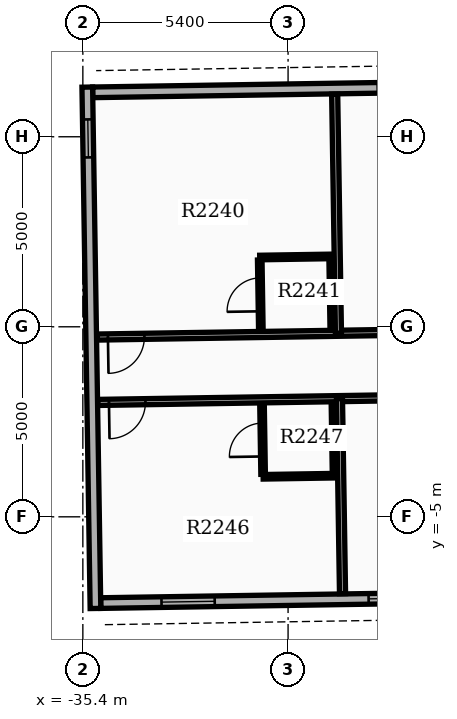
"""IFC4 building model, lengths in metres.
Left out: names, types, materials, properties, quantities, classifications, styles, units other than length and angle.
Written with IfcOpenShell. Run it as: python <this file> out.ifc"""

import sys

from ifc_helpers import new_model, si_unit, direction, frame, frame_2d, origin, place, context, subcontext, project, spatial, rectangle, extrude, element, fill, save


model = new_model("IFC4")
c1 = context("Model", 3, precision=1e-05, world=origin(), true_north=direction((0.0, 1.0)))
c2 = subcontext(c1, "Body", "Model", "MODEL_VIEW")
j1 = project(units=[si_unit("LENGTHUNIT", "METRE"), si_unit("PLANEANGLEUNIT", "RADIAN")], contexts=[c1])
p1 = place(None, origin())
s1 = spatial("IfcSite", under=j1, at=p1, CompositionType="ELEMENT")
p2 = place(p1, origin())
s2 = spatial("IfcBuilding", under=s1, at=p2, CompositionType="ELEMENT")
p3 = place(p2, frame((0.0, 0.0, 139.8)))
s3 = spatial("IfcBuildingStorey", under=s2, at=p3, CompositionType="ELEMENT", Elevation=139.8)
p4 = place(p3, frame((-15.044, 6.485, 0.0), z_axis=(0.0, 0.0, 1.0), x_axis=(-0.999876474133, -0.01571739401, 0.0)))
e1 = element("IfcWall", 1, at=p4, inside=s3, PredefinedType="STANDARD", context=c2, shape_type="SweptSolid", body=[
    extrude(rectangle(XDim=20.1, YDim=0.28, at=frame_2d((10.05, 0.0))), origin(), (0.0, 0.0, 1.0), 2.92),
])
p5 = place(p4, frame((1.6, 0.0, 0.8)))
e2 = element("IfcOpeningElement", 2, at=p5, cuts=e1, PredefinedType="OPENING", context=c2, shape_type="SweptSolid", body=[
    extrude(rectangle(XDim=1.4, YDim=1.6, at=frame_2d((0.7, 0.8))), frame((0.0, 0.15, 0.0), z_axis=(0.0, -1.0, 0.0), x_axis=(1.0, 0.0, 0.0)), (0.0, 0.0, 1.0), 0.3),
])
p6 = place(p4, frame((4.8, 0.0, 0.8)))
e3 = element("IfcOpeningElement", 3, at=p6, cuts=e1, PredefinedType="OPENING", context=c2, shape_type="SweptSolid", body=[
    extrude(rectangle(XDim=1.4, YDim=1.6, at=frame_2d((0.7, 0.8))), frame((0.0, 0.15, 0.0), z_axis=(0.0, -1.0, 0.0), x_axis=(1.0, 0.0, 0.0)), (0.0, 0.0, 1.0), 0.3),
])
p7 = place(p4, frame((8.0, 0.0, 0.8)))
e4 = element("IfcOpeningElement", 4, at=p7, cuts=e1, PredefinedType="OPENING", context=c2, shape_type="SweptSolid", body=[
    extrude(rectangle(XDim=1.4, YDim=1.6, at=frame_2d((0.7, 0.8))), frame((0.0, 0.15, 0.0), z_axis=(0.0, -1.0, 0.0), x_axis=(1.0, 0.0, 0.0)), (0.0, 0.0, 1.0), 0.3),
])
p8 = place(p4, frame((11.2, 0.0, 0.8)))
e5 = element("IfcOpeningElement", 5, at=p8, cuts=e1, PredefinedType="OPENING", context=c2, shape_type="SweptSolid", body=[
    extrude(rectangle(XDim=1.4, YDim=1.6, at=frame_2d((0.7, 0.8))), frame((0.0, 0.15, 0.0), z_axis=(0.0, -1.0, 0.0), x_axis=(1.0, 0.0, 0.0)), (0.0, 0.0, 1.0), 0.3),
])
p9 = place(p3, frame((-34.93, -7.27, 0.0), z_axis=(0.0, 0.0, 1.0), x_axis=(0.999876667941, 0.015705059908, 0.0)))
e6 = element("IfcWall", 6, at=p9, inside=s3, PredefinedType="STANDARD", context=c2, shape_type="SweptSolid", body=[
    extrude(rectangle(XDim=20.1, YDim=0.28, at=frame_2d((10.05, 0.0))), origin(), (0.0, 0.0, 1.0), 2.92),
])
p10 = place(p9, frame((1.6, 0.0, 0.8)))
e7 = element("IfcOpeningElement", 7, at=p10, cuts=e6, PredefinedType="OPENING", context=c2, shape_type="SweptSolid", body=[
    extrude(rectangle(XDim=1.4, YDim=1.6, at=frame_2d((0.7, 0.8))), frame((0.0, 0.15, 0.0), z_axis=(0.0, -1.0, 0.0), x_axis=(1.0, 0.0, 0.0)), (0.0, 0.0, 1.0), 0.3),
])
p11 = place(p9, frame((7.05, 0.0, 0.8)))
e8 = element("IfcOpeningElement", 8, at=p11, cuts=e6, PredefinedType="OPENING", context=c2, shape_type="SweptSolid", body=[
    extrude(rectangle(XDim=1.4, YDim=1.6, at=frame_2d((0.7, 0.8))), frame((0.0, 0.15, 0.0), z_axis=(0.0, -1.0, 0.0), x_axis=(1.0, 0.0, 0.0)), (0.0, 0.0, 1.0), 0.3),
])
p12 = place(p9, frame((10.25, 0.0, 0.8)))
e9 = element("IfcOpeningElement", 9, at=p12, cuts=e6, PredefinedType="OPENING", context=c2, shape_type="SweptSolid", body=[
    extrude(rectangle(XDim=1.4, YDim=1.6, at=frame_2d((0.7, 0.8))), frame((0.0, 0.15, 0.0), z_axis=(0.0, -1.0, 0.0), x_axis=(1.0, 0.0, 0.0)), (0.0, 0.0, 1.0), 0.3),
])
p13 = place(p9, frame((13.95, 0.0, 0.8)))
e10 = element("IfcOpeningElement", 10, at=p13, cuts=e6, PredefinedType="OPENING", context=c2, shape_type="SweptSolid", body=[
    extrude(rectangle(XDim=1.4, YDim=1.6, at=frame_2d((0.7, 0.8))), frame((0.0, 0.15, 0.0), z_axis=(0.0, -1.0, 0.0), x_axis=(1.0, 0.0, 0.0)), (0.0, 0.0, 1.0), 0.3),
])
p14 = place(p3, frame((-35.283, 6.307, 0.0), z_axis=(0.0, 0.0, 1.0), x_axis=(0.015712599986, -0.999876549481, 0.0)))
e11 = element("IfcWall", 11, at=p14, inside=s3, PredefinedType="STANDARD", context=c2, shape_type="SweptSolid", body=[
    extrude(rectangle(XDim=13.72, YDim=0.28, at=frame_2d((6.86, 0.0))), origin(), (0.0, 0.0, 1.0), 2.92),
])
p15 = place(p14, frame((0.85, 0.0, 0.85)))
e12 = element("IfcOpeningElement", 12, at=p15, cuts=e11, PredefinedType="OPENING", context=c2, shape_type="SweptSolid", body=[
    extrude(rectangle(XDim=1.0, YDim=1.5, at=frame_2d((0.5, 0.75))), frame((0.0, 0.15, 0.0), z_axis=(0.0, -1.0, 0.0), x_axis=(1.0, 0.0, 0.0)), (0.0, 0.0, 1.0), 0.3),
])
p16 = place(p3, frame((-14.853, 0.047, 0.0), z_axis=(0.0, 0.0, 1.0), x_axis=(-0.999876717676, -0.015701893165, 0.0)))
e13 = element("IfcWall", 13, at=p16, inside=s3, PredefinedType="PARTITIONING", context=c2, shape_type="SweptSolid", body=[
    extrude(rectangle(XDim=20.182, YDim=0.16, at=frame_2d((10.091, 0.0))), origin(), (0.0, 0.0, 1.0), 2.91),
])
p17 = place(p16, frame((2.661, 0.0, 0.0)))
e14 = element("IfcOpeningElement", 14, at=p17, cuts=e13, PredefinedType="OPENING", context=c2, shape_type="SweptSolid", body=[
    extrude(rectangle(XDim=0.96, YDim=2.15, at=frame_2d((0.48, 1.075))), frame((0.0, 0.09, 0.0), z_axis=(0.0, -1.0, 0.0), x_axis=(1.0, 0.0, 0.0)), (0.0, 0.0, 1.0), 0.18),
])
p18 = place(p16, frame((9.492, 0.0, 0.0)))
e15 = element("IfcOpeningElement", 15, at=p18, cuts=e13, PredefinedType="OPENING", context=c2, shape_type="SweptSolid", body=[
    extrude(rectangle(XDim=0.96, YDim=2.15, at=frame_2d((0.48, 1.075))), frame((0.0, 0.09, 0.0), z_axis=(0.0, -1.0, 0.0), x_axis=(1.0, 0.0, 0.0)), (0.0, 0.0, 1.0), 0.18),
])
p19 = place(p16, frame((18.93, 0.0, 0.0)))
e16 = element("IfcOpeningElement", 16, at=p19, cuts=e13, PredefinedType="OPENING", context=c2, shape_type="SweptSolid", body=[
    extrude(rectangle(XDim=0.96, YDim=2.15, at=frame_2d((0.48, 1.075))), frame((0.0, 0.09, 0.0), z_axis=(0.0, -1.0, 0.0), x_axis=(1.0, 0.0, 0.0)), (0.0, 0.0, 1.0), 0.18),
])
p20 = place(p3, frame((-28.675, -0.17, 0.0), z_axis=(0.0, 0.0, 1.0), x_axis=(-0.01571461794, 0.999876517768, 0.0)))
e17 = element("IfcWall", 17, at=p20, inside=s3, PredefinedType="PARTITIONING", context=c2, shape_type="SweptSolid", body=[
    extrude(rectangle(XDim=6.292, YDim=0.16, at=frame_2d((3.146, 0.0))), origin(), (0.0, 0.0, 1.0), 2.91),
])
p21 = place(p3, frame((-30.717, -0.062, 0.0), z_axis=(0.0, 0.0, 1.0), x_axis=(-0.015694337248, 0.999876836305, 0.0)))
e18 = element("IfcWall", 18, at=p21, inside=s3, PredefinedType="PARTITIONING", context=c2, shape_type="SweptSolid", body=[
    extrude(rectangle(XDim=1.82, YDim=0.12, at=frame_2d((0.91, 0.0))), origin(), (0.0, 0.0, 1.0), 2.91),
])
p22 = place(p21, frame((0.47, 0.0, 0.0)))
e19 = element("IfcOpeningElement", 19, at=p22, cuts=e18, PredefinedType="OPENING", context=c2, shape_type="SweptSolid", body=[
    extrude(rectangle(XDim=0.88, YDim=2.1, at=frame_2d((0.44, 1.05))), frame((0.0, 0.07, 0.0), z_axis=(0.0, -1.0, 0.0), x_axis=(1.0, 0.0, 0.0)), (0.0, 0.0, 1.0), 0.14),
])
p23 = place(p3, frame((-28.837, -0.033, 0.0), z_axis=(0.0, 0.0, 1.0), x_axis=(-0.015694337248, 0.999876836305, 0.0)))
e20 = element("IfcWall", 20, at=p23, inside=s3, PredefinedType="PARTITIONING", context=c2, shape_type="SweptSolid", body=[
    extrude(rectangle(XDim=1.82, YDim=0.12, at=frame_2d((0.91, 0.0))), origin(), (0.0, 0.0, 1.0), 2.91),
])
p24 = place(p3, frame((-28.867, 1.852, 0.0), z_axis=(0.0, 0.0, 1.0), x_axis=(-0.99987652141, -0.015714386166, 0.0)))
e21 = element("IfcWall", 21, at=p24, inside=s3, PredefinedType="PARTITIONING", context=c2, shape_type="SweptSolid", body=[
    extrude(rectangle(XDim=1.88, YDim=0.12, at=frame_2d((0.94, 0.0))), origin(), (0.0, 0.0, 1.0), 2.91),
])
p25 = place(p3, frame((-14.825, -1.673, 0.0), z_axis=(0.0, 0.0, 1.0), x_axis=(-0.999876717676, -0.015701893165, 0.0)))
e22 = element("IfcWall", 22, at=p25, inside=s3, PredefinedType="PARTITIONING", context=c2, shape_type="SweptSolid", body=[
    extrude(rectangle(XDim=20.182, YDim=0.16, at=frame_2d((10.091, 0.0))), origin(), (0.0, 0.0, 1.0), 2.91),
])
p26 = place(p25, frame((2.661, 0.0, 0.0)))
e23 = element("IfcOpeningElement", 23, at=p26, cuts=e22, PredefinedType="OPENING", context=c2, shape_type="SweptSolid", body=[
    extrude(rectangle(XDim=0.96, YDim=2.15, at=frame_2d((0.48, 1.075))), frame((0.0, 0.09, 0.0), z_axis=(0.0, -1.0, 0.0), x_axis=(1.0, 0.0, 0.0)), (0.0, 0.0, 1.0), 0.18),
])
p27 = place(p25, frame((9.492, 0.0, 0.0)))
e24 = element("IfcOpeningElement", 24, at=p27, cuts=e22, PredefinedType="OPENING", context=c2, shape_type="SweptSolid", body=[
    extrude(rectangle(XDim=0.96, YDim=2.15, at=frame_2d((0.48, 1.075))), frame((0.0, 0.09, 0.0), z_axis=(0.0, -1.0, 0.0), x_axis=(1.0, 0.0, 0.0)), (0.0, 0.0, 1.0), 0.18),
])
p28 = place(p25, frame((18.93, 0.0, 0.0)))
e25 = element("IfcOpeningElement", 25, at=p28, cuts=e22, PredefinedType="OPENING", context=c2, shape_type="SweptSolid", body=[
    extrude(rectangle(XDim=0.96, YDim=2.15, at=frame_2d((0.48, 1.075))), frame((0.0, 0.09, 0.0), z_axis=(0.0, -1.0, 0.0), x_axis=(1.0, 0.0, 0.0)), (0.0, 0.0, 1.0), 0.18),
])
p29 = place(p3, frame((-28.648, -1.89, 0.0), z_axis=(0.0, 0.0, 1.0), x_axis=(0.015698892967, -0.999876764786, 0.0)))
e26 = element("IfcWall", 26, at=p29, inside=s3, PredefinedType="PARTITIONING", context=c2, shape_type="SweptSolid", body=[
    extrude(rectangle(XDim=5.132, YDim=0.16, at=frame_2d((2.566, 0.0))), origin(), (0.0, 0.0, 1.0), 2.91),
])
p30 = place(p3, frame((-30.657, -3.882, 0.0), z_axis=(0.0, 0.0, 1.0), x_axis=(-0.015694337248, 0.999876836305, 0.0)))
e27 = element("IfcWall", 27, at=p30, inside=s3, PredefinedType="PARTITIONING", context=c2, shape_type="SweptSolid", body=[
    extrude(rectangle(XDim=1.82, YDim=0.12, at=frame_2d((0.91, 0.0))), origin(), (0.0, 0.0, 1.0), 2.91),
])
p31 = place(p30, frame((0.47, 0.0, 0.0)))
e28 = element("IfcOpeningElement", 28, at=p31, cuts=e27, PredefinedType="OPENING", context=c2, shape_type="SweptSolid", body=[
    extrude(rectangle(XDim=0.88, YDim=2.1, at=frame_2d((0.44, 1.05))), frame((0.0, 0.07, 0.0), z_axis=(0.0, -1.0, 0.0), x_axis=(1.0, 0.0, 0.0)), (0.0, 0.0, 1.0), 0.14),
])
p32 = place(p3, frame((-28.777, -3.853, 0.0), z_axis=(0.0, 0.0, 1.0), x_axis=(-0.015694337248, 0.999876836305, 0.0)))
e29 = element("IfcWall", 29, at=p32, inside=s3, PredefinedType="PARTITIONING", context=c2, shape_type="SweptSolid", body=[
    extrude(rectangle(XDim=1.82, YDim=0.12, at=frame_2d((0.91, 0.0))), origin(), (0.0, 0.0, 1.0), 2.91),
])
p33 = place(p3, frame((-28.776, -3.917, 0.0), z_axis=(0.0, 0.0, 1.0), x_axis=(-0.999876553475, -0.01571234584, 0.0)))
e30 = element("IfcWall", 30, at=p33, inside=s3, PredefinedType="PARTITIONING", context=c2, shape_type="SweptSolid", body=[
    extrude(rectangle(XDim=1.88, YDim=0.12, at=frame_2d((0.94, 0.0))), origin(), (0.0, 0.0, 1.0), 2.91),
])
p34 = place(p10, origin())
e31 = element("IfcWindow", 31, at=p34, inside=s3, PartitioningType="SINGLE_PANEL", PredefinedType="WINDOW", context=c2, shape_type="SweptSolid", body=[
    extrude(rectangle(XDim=1.4, YDim=1.6, at=frame_2d((0.7, 0.8))), frame((0.0, 0.03, 0.0), z_axis=(0.0, -1.0, 0.0), x_axis=(1.0, 0.0, 0.0)), (0.0, 0.0, 1.0), 0.06),
])
fill(e7, e31)
p35 = place(p11, origin())
e32 = element("IfcWindow", 32, at=p35, inside=s3, PartitioningType="SINGLE_PANEL", PredefinedType="WINDOW", context=c2, shape_type="SweptSolid", body=[
    extrude(rectangle(XDim=1.4, YDim=1.6, at=frame_2d((0.7, 0.8))), frame((0.0, 0.03, 0.0), z_axis=(0.0, -1.0, 0.0), x_axis=(1.0, 0.0, 0.0)), (0.0, 0.0, 1.0), 0.06),
])
fill(e8, e32)
p36 = place(p15, origin())
e33 = element("IfcWindow", 33, at=p36, inside=s3, PartitioningType="SINGLE_PANEL", PredefinedType="WINDOW", context=c2, shape_type="SweptSolid", body=[
    extrude(rectangle(XDim=1.0, YDim=1.5, at=frame_2d((0.5, 0.75))), frame((0.0, 0.03, 0.0), z_axis=(0.0, -1.0, 0.0), x_axis=(1.0, 0.0, 0.0)), (0.0, 0.0, 1.0), 0.06),
])
fill(e12, e33)
p37 = place(p19, origin())
e34 = element("IfcDoor", 34, at=p37, inside=s3, OperationType="SINGLE_SWING_RIGHT", PredefinedType="DOOR", context=c2, shape_type="SweptSolid", body=[
    extrude(rectangle(XDim=0.96, YDim=2.15, at=frame_2d((0.48, 1.075))), frame((0.0, 0.025, 0.0), z_axis=(0.0, -1.0, 0.0), x_axis=(1.0, 0.0, 0.0)), (0.0, 0.0, 1.0), 0.05),
])
fill(e16, e34)
p38 = place(p22, origin())
e35 = element("IfcDoor", 35, at=p38, inside=s3, OperationType="SINGLE_SWING_LEFT", PredefinedType="DOOR", context=c2, shape_type="SweptSolid", body=[
    extrude(rectangle(XDim=0.88, YDim=2.1, at=frame_2d((0.44, 1.05))), frame((0.0, 0.025, 0.0), z_axis=(0.0, -1.0, 0.0), x_axis=(1.0, 0.0, 0.0)), (0.0, 0.0, 1.0), 0.05),
])
fill(e19, e35)
p39 = place(p28, origin())
e36 = element("IfcDoor", 36, at=p39, inside=s3, OperationType="SINGLE_SWING_RIGHT", PredefinedType="DOOR", context=c2, shape_type="SweptSolid", body=[
    extrude(rectangle(XDim=0.96, YDim=2.15, at=frame_2d((0.48, 1.075))), frame((0.0, 0.025, 0.0), z_axis=(0.0, -1.0, 0.0), x_axis=(1.0, 0.0, 0.0)), (0.0, 0.0, 1.0), 0.05),
])
fill(e25, e36)
p40 = place(p31, origin())
e37 = element("IfcDoor", 37, at=p40, inside=s3, OperationType="SINGLE_SWING_LEFT", PredefinedType="DOOR", context=c2, shape_type="SweptSolid", body=[
    extrude(rectangle(XDim=0.88, YDim=2.1, at=frame_2d((0.44, 1.05))), frame((0.0, 0.025, 0.0), z_axis=(0.0, -1.0, 0.0), x_axis=(1.0, 0.0, 0.0)), (0.0, 0.0, 1.0), 0.05),
])
fill(e28, e37)
save(model, sys.argv[1])
